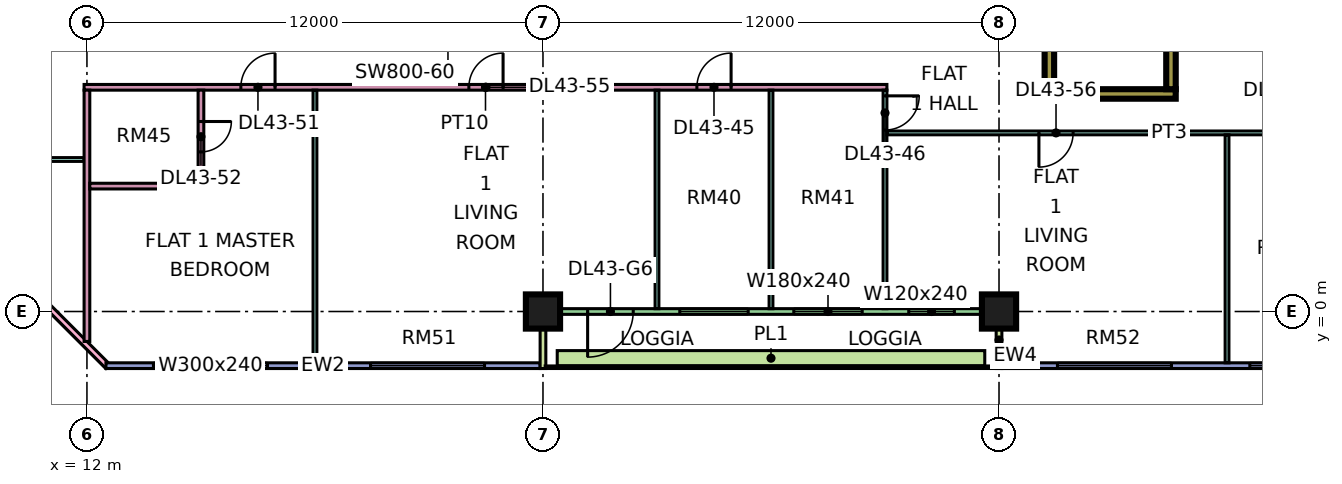
"""IFC4 building model, lengths in metres.
Left out: names, types, materials, properties, quantities, classifications, styles, units other than length and angle.
Written with IfcOpenShell. Run it as: python <this file> out.ifc"""

import sys

from ifc_helpers import new_model, si_unit, direction, frame, frame_2d, origin, origin_2d, place, context, subcontext, project, spatial, rectangle, extrude, element, fill, save


model = new_model("IFC4")
c1 = context("Model", 3, precision=1e-05, world=origin(), true_north=direction((0.0, 1.0)))
c2 = subcontext(c1, "Body", "Model", "MODEL_VIEW")
j1 = project(units=[si_unit("LENGTHUNIT", "METRE"), si_unit("PLANEANGLEUNIT", "RADIAN")], contexts=[c1])
p1 = place(None, origin())
s1 = spatial("IfcSite", under=j1, at=p1, CompositionType="ELEMENT")
p2 = place(p1, origin())
s2 = spatial("IfcBuilding", under=s1, at=p2, CompositionType="ELEMENT")
p3 = place(p2, frame((0.0, 0.0, 187.4)))
s3 = spatial("IfcBuildingStorey", under=s2, at=p3, CompositionType="ELEMENT", Elevation=187.4)
for number, where, z_axis, x_axis in (
    (1, (24.0, 0.0, 0.0), (0.0, 0.0, 1.0), (1.0, 0.0, 0.0)),
    (2, (36.0, 0.0, 0.0), (0.0, 0.0, 1.0), (1.0, 0.0, 0.0)),
):
    element("IfcColumn", number, at=place(p3, frame(where, z_axis=z_axis, x_axis=x_axis)), inside=s3, PredefinedType="COLUMN", context=c2, shape_type="SweptSolid", body=[
        extrude(rectangle(XDim=0.9, YDim=0.9, at=origin_2d()), origin(), (0.0, 0.0, 1.0), 3.75),
    ])
p4 = place(p3, frame((37.2, 5.725, 0.0), z_axis=(0.0, 0.0, 1.0), x_axis=(1.0, 0.0, 0.0)))
e3 = element("IfcWall", 3, at=p4, inside=s3, PredefinedType="SHEAR", context=c2, shape_type="SweptSolid", body=[
    extrude(rectangle(XDim=3.45, YDim=0.25, at=frame_2d((1.725, 0.0))), origin(), (0.0, 0.0, 1.0), 3.75),
])
for number, where, z_axis, x_axis in (
    (4, (37.325, 5.85, 0.0), (0.0, 0.0, 1.0), (0.0, 1.0, 0.0)),
    (5, (40.525, 5.85, 0.0), (0.0, 0.0, 1.0), (0.0, 1.0, 0.0)),
):
    element("IfcWall", number, at=place(p3, frame(where, z_axis=z_axis, x_axis=x_axis)), inside=s3, PredefinedType="SHEAR", context=c2, shape_type="SweptSolid", body=[
        extrude(rectangle(XDim=6.5, YDim=0.25, at=frame_2d((3.25, 0.0))), origin(), (0.0, 0.0, 1.0), 3.75),
    ])
p5 = place(p3, frame((-1.447, 12.553, 0.0), z_axis=(0.0, 0.0, 1.0), x_axis=(0.707106781187, -0.707106781187, 0.0)))
e6 = element("IfcWall", 6, at=p5, inside=s3, PredefinedType="SOLIDWALL", context=c2, shape_type="SweptSolid", body=[
    extrude(rectangle(XDim=19.799, YDim=0.15, at=frame_2d((9.899, 0.0))), origin(), (0.0, 0.0, 1.0), 3.35),
])
p6 = place(p5, frame((2.212, 0.0, 0.45)))
e7 = element("IfcOpeningElement", 7, at=p6, cuts=e6, PredefinedType="OPENING", context=c2, shape_type="SweptSolid", body=[
    extrude(rectangle(XDim=3.0, YDim=2.4, at=frame_2d((1.5, 1.2))), frame((0.0, 0.085, 0.0), z_axis=(0.0, -1.0, 0.0), x_axis=(1.0, 0.0, 0.0)), (0.0, 0.0, 1.0), 0.17),
])
p7 = place(p5, frame((10.216, 0.0, 0.45)))
e8 = element("IfcOpeningElement", 8, at=p7, cuts=e6, PredefinedType="OPENING", context=c2, shape_type="SweptSolid", body=[
    extrude(rectangle(XDim=3.0, YDim=2.4, at=frame_2d((1.5, 1.2))), frame((0.0, 0.085, 0.0), z_axis=(0.0, -1.0, 0.0), x_axis=(1.0, 0.0, 0.0)), (0.0, 0.0, 1.0), 0.17),
])
p8 = place(p3, frame((12.5, -1.425, 0.0), z_axis=(0.0, 0.0, 1.0), x_axis=(1.0, 0.0, 0.0)))
e9 = element("IfcWall", 9, at=p8, inside=s3, PredefinedType="SOLIDWALL", context=c2, shape_type="SweptSolid", body=[
    extrude(rectangle(XDim=11.425, YDim=0.15, at=frame_2d((5.712, 0.0))), origin(), (0.0, 0.0, 1.0), 3.35),
])
p9 = place(p8, frame((1.25, 0.0, 0.45)))
e10 = element("IfcOpeningElement", 10, at=p9, cuts=e9, PredefinedType="OPENING", context=c2, shape_type="SweptSolid", body=[
    extrude(rectangle(XDim=3.0, YDim=2.4, at=frame_2d((1.5, 1.2))), frame((0.0, 0.085, 0.0), z_axis=(0.0, -1.0, 0.0), x_axis=(1.0, 0.0, 0.0)), (0.0, 0.0, 1.0), 0.17),
])
p10 = place(p8, frame((6.962, 0.0, 0.45)))
e11 = element("IfcOpeningElement", 11, at=p10, cuts=e9, PredefinedType="OPENING", context=c2, shape_type="SweptSolid", body=[
    extrude(rectangle(XDim=3.0, YDim=2.4, at=frame_2d((1.5, 1.2))), frame((0.0, 0.085, 0.0), z_axis=(0.0, -1.0, 0.0), x_axis=(1.0, 0.0, 0.0)), (0.0, 0.0, 1.0), 0.17),
])
p11 = place(p3, frame((24.075, 0.0, 0.0), z_axis=(0.0, 0.0, 1.0), x_axis=(1.0, 0.0, 0.0)))
e12 = element("IfcWall", 12, at=p11, inside=s3, PredefinedType="SOLIDWALL", context=c2, shape_type="SweptSolid", body=[
    extrude(rectangle(XDim=11.85, YDim=0.15, at=frame_2d((5.925, 0.0))), origin(), (0.0, 0.0, 1.0), 3.35),
])
p12 = place(p11, frame((1.1, 0.0, 0.0)))
e13 = element("IfcOpeningElement", 13, at=p12, cuts=e12, PredefinedType="OPENING", context=c2, shape_type="SweptSolid", body=[
    extrude(rectangle(XDim=1.2, YDim=2.4, at=frame_2d((0.6, 1.2))), frame((0.0, 0.085, 0.0), z_axis=(0.0, -1.0, 0.0), x_axis=(1.0, 0.0, 0.0)), (0.0, 0.0, 1.0), 0.17),
])
p13 = place(p11, frame((3.525, 0.0, 0.45)))
e14 = element("IfcOpeningElement", 14, at=p13, cuts=e12, PredefinedType="OPENING", context=c2, shape_type="SweptSolid", body=[
    extrude(rectangle(XDim=1.8, YDim=2.4, at=frame_2d((0.9, 1.2))), frame((0.0, 0.085, 0.0), z_axis=(0.0, -1.0, 0.0), x_axis=(1.0, 0.0, 0.0)), (0.0, 0.0, 1.0), 0.17),
])
p14 = place(p11, frame((6.525, 0.0, 0.45)))
e15 = element("IfcOpeningElement", 15, at=p14, cuts=e12, PredefinedType="OPENING", context=c2, shape_type="SweptSolid", body=[
    extrude(rectangle(XDim=1.8, YDim=2.4, at=frame_2d((0.9, 1.2))), frame((0.0, 0.085, 0.0), z_axis=(0.0, -1.0, 0.0), x_axis=(1.0, 0.0, 0.0)), (0.0, 0.0, 1.0), 0.17),
])
p15 = place(p11, frame((9.55, 0.0, 0.45)))
e16 = element("IfcOpeningElement", 16, at=p15, cuts=e12, PredefinedType="OPENING", context=c2, shape_type="SweptSolid", body=[
    extrude(rectangle(XDim=1.2, YDim=2.4, at=frame_2d((0.6, 1.2))), frame((0.0, 0.085, 0.0), z_axis=(0.0, -1.0, 0.0), x_axis=(1.0, 0.0, 0.0)), (0.0, 0.0, 1.0), 0.17),
])
for number, where, z_axis, x_axis in (
    (17, (24.0, -1.5, 0.0), (0.0, 0.0, 1.0), (0.0, 1.0, 0.0)),
    (18, (36.0, -1.5, 0.0), (0.0, 0.0, 1.0), (0.0, 1.0, 0.0)),
):
    element("IfcWall", number, at=place(p3, frame(where, z_axis=z_axis, x_axis=x_axis)), inside=s3, PredefinedType="SOLIDWALL", context=c2, shape_type="SweptSolid", body=[
        extrude(rectangle(XDim=1.5, YDim=0.15, at=frame_2d((0.75, 0.0))), origin(), (0.0, 0.0, 1.0), 3.35),
    ])
p16 = place(p3, frame((36.075, -1.425, 0.0), z_axis=(0.0, 0.0, 1.0), x_axis=(1.0, 0.0, 0.0)))
e19 = element("IfcWall", 19, at=p16, inside=s3, PredefinedType="SOLIDWALL", context=c2, shape_type="SweptSolid", body=[
    extrude(rectangle(XDim=11.85, YDim=0.15, at=frame_2d((5.925, 0.0))), origin(), (0.0, 0.0, 1.0), 3.35),
])
p17 = place(p16, frame((1.462, 0.0, 0.45)))
e20 = element("IfcOpeningElement", 20, at=p17, cuts=e19, PredefinedType="OPENING", context=c2, shape_type="SweptSolid", body=[
    extrude(rectangle(XDim=3.0, YDim=2.4, at=frame_2d((1.5, 1.2))), frame((0.0, 0.085, 0.0), z_axis=(0.0, -1.0, 0.0), x_axis=(1.0, 0.0, 0.0)), (0.0, 0.0, 1.0), 0.17),
])
p18 = place(p16, frame((6.525, 0.0, 0.45)))
e21 = element("IfcOpeningElement", 21, at=p18, cuts=e19, PredefinedType="OPENING", context=c2, shape_type="SweptSolid", body=[
    extrude(rectangle(XDim=1.8, YDim=2.4, at=frame_2d((0.9, 1.2))), frame((0.0, 0.085, 0.0), z_axis=(0.0, -1.0, 0.0), x_axis=(1.0, 0.0, 0.0)), (0.0, 0.0, 1.0), 0.17),
])
p19 = place(p16, frame((9.488, 0.0, 0.45)))
e22 = element("IfcOpeningElement", 22, at=p19, cuts=e19, PredefinedType="OPENING", context=c2, shape_type="SweptSolid", body=[
    extrude(rectangle(XDim=1.8, YDim=2.4, at=frame_2d((0.9, 1.2))), frame((0.0, 0.085, 0.0), z_axis=(0.0, -1.0, 0.0), x_axis=(1.0, 0.0, 0.0)), (0.0, 0.0, 1.0), 0.17),
])
p20 = place(p3, frame((24.375, -1.229, 0.0), z_axis=(0.0, 0.0, 1.0), x_axis=(1.0, 0.0, 0.0)))
e23 = element("IfcWall", 23, at=p20, inside=s3, PredefinedType="SOLIDWALL", context=c2, shape_type="SweptSolid", body=[
    extrude(rectangle(XDim=11.25, YDim=0.4, at=frame_2d((5.625, 0.0))), origin(), (0.0, 0.0, 1.0), 0.7),
])
p21 = place(p3, frame((9.05, 4.0, 0.0), z_axis=(0.0, 0.0, 1.0), x_axis=(1.0, 0.0, 0.0)))
e24 = element("IfcWall", 24, at=p21, inside=s3, PredefinedType="PARTITIONING", context=c2, shape_type="SweptSolid", body=[
    extrude(rectangle(XDim=2.875, YDim=0.1, at=frame_2d((1.438, 0.0))), origin(), (0.0, 0.0, 1.0), 3.35),
])
p22 = place(p3, frame((11.925, 5.9, 0.0), z_axis=(0.0, 0.0, 1.0), x_axis=(1.0, 0.0, 0.0)))
e25 = element("IfcWall", 25, at=p22, inside=s3, PredefinedType="PARTITIONING", context=c2, shape_type="SweptSolid", body=[
    extrude(rectangle(XDim=21.125, YDim=0.15, at=frame_2d((10.562, 0.0))), origin(), (0.0, 0.0, 1.0), 3.35),
])
p23 = place(p22, frame((16.125, 0.0, 0.0)))
e26 = element("IfcOpeningElement", 26, at=p23, cuts=e25, PredefinedType="OPENING", context=c2, shape_type="SweptSolid", body=[
    extrude(rectangle(XDim=0.9, YDim=2.1, at=frame_2d((0.45, 1.05))), frame((0.0, 0.085, 0.0), z_axis=(0.0, -1.0, 0.0), x_axis=(1.0, 0.0, 0.0)), (0.0, 0.0, 1.0), 0.17),
])
p24 = place(p22, frame((4.125, 0.0, 0.0)))
e27 = element("IfcOpeningElement", 27, at=p24, cuts=e25, PredefinedType="OPENING", context=c2, shape_type="SweptSolid", body=[
    extrude(rectangle(XDim=0.9, YDim=2.1, at=frame_2d((0.45, 1.05))), frame((0.0, 0.085, 0.0), z_axis=(0.0, -1.0, 0.0), x_axis=(1.0, 0.0, 0.0)), (0.0, 0.0, 1.0), 0.17),
])
p25 = place(p22, frame((10.125, 0.0, 0.0)))
e28 = element("IfcOpeningElement", 28, at=p25, cuts=e25, PredefinedType="OPENING", context=c2, shape_type="SweptSolid", body=[
    extrude(rectangle(XDim=0.9, YDim=2.1, at=frame_2d((0.45, 1.05))), frame((0.0, 0.085, 0.0), z_axis=(0.0, -1.0, 0.0), x_axis=(1.0, 0.0, 0.0)), (0.0, 0.0, 1.0), 0.17),
])
p26 = place(p3, frame((12.0, -0.788, 0.0), z_axis=(0.0, 0.0, 1.0), x_axis=(0.0, 1.0, 0.0)))
e29 = element("IfcWall", 29, at=p26, inside=s3, PredefinedType="PARTITIONING", context=c2, shape_type="SweptSolid", body=[
    extrude(rectangle(XDim=6.613, YDim=0.15, at=frame_2d((3.306, 0.0))), origin(), (0.0, 0.0, 1.0), 3.35),
])
p27 = place(p3, frame((12.075, 3.3, 0.0), z_axis=(0.0, 0.0, 1.0), x_axis=(1.0, 0.0, 0.0)))
e30 = element("IfcWall", 30, at=p27, inside=s3, PredefinedType="PARTITIONING", context=c2, shape_type="SweptSolid", body=[
    extrude(rectangle(XDim=3.0, YDim=0.15, at=frame_2d((1.5, 0.0))), origin(), (0.0, 0.0, 1.0), 3.35),
])
p28 = place(p3, frame((15.0, 3.375, 0.0), z_axis=(0.0, 0.0, 1.0), x_axis=(0.0, 1.0, 0.0)))
e31 = element("IfcWall", 31, at=p28, inside=s3, PredefinedType="PARTITIONING", context=c2, shape_type="SweptSolid", body=[
    extrude(rectangle(XDim=2.45, YDim=0.15, at=frame_2d((1.225, 0.0))), origin(), (0.0, 0.0, 1.0), 3.35),
])
p29 = place(p28, frame((0.825, 0.0, 0.0)))
e32 = element("IfcOpeningElement", 32, at=p29, cuts=e31, PredefinedType="OPENING", context=c2, shape_type="SweptSolid", body=[
    extrude(rectangle(XDim=0.8, YDim=2.1, at=frame_2d((0.4, 1.05))), frame((0.0, 0.085, 0.0), z_axis=(0.0, -1.0, 0.0), x_axis=(1.0, 0.0, 0.0)), (0.0, 0.0, 1.0), 0.17),
])
p30 = place(p3, frame((18.0, -1.35, 0.0), z_axis=(0.0, 0.0, 1.0), x_axis=(0.0, 1.0, 0.0)))
e33 = element("IfcWall", 33, at=p30, inside=s3, PredefinedType="PARTITIONING", context=c2, shape_type="SweptSolid", body=[
    extrude(rectangle(XDim=7.175, YDim=0.1, at=frame_2d((3.587, 0.0))), origin(), (0.0, 0.0, 1.0), 3.35),
])
for number, where, z_axis, x_axis in (
    (34, (27.0, 0.074, 0.0), (0.0, 0.0, 1.0), (0.0, 1.0, 0.0)),
    (35, (30.0, 0.074, 0.0), (0.0, 0.0, 1.0), (0.0, 1.0, 0.0)),
):
    element("IfcWall", number, at=place(p3, frame(where, z_axis=z_axis, x_axis=x_axis)), inside=s3, PredefinedType="PARTITIONING", context=c2, shape_type="SweptSolid", body=[
        extrude(rectangle(XDim=5.751, YDim=0.1, at=frame_2d((2.875, 0.0))), origin(), (0.0, 0.0, 1.0), 3.35),
    ])
p31 = place(p3, frame((33.0, 0.074, 0.0), z_axis=(0.0, 0.0, 1.0), x_axis=(0.0, 1.0, 0.0)))
e36 = element("IfcWall", 36, at=p31, inside=s3, PredefinedType="PARTITIONING", context=c2, shape_type="SweptSolid", body=[
    extrude(rectangle(XDim=5.751, YDim=0.1, at=frame_2d((2.875, 0.0))), origin(), (0.0, 0.0, 1.0), 3.35),
])
p32 = place(p31, frame((4.701, 0.0, 0.0)))
e37 = element("IfcOpeningElement", 37, at=p32, cuts=e36, PredefinedType="OPENING", context=c2, shape_type="SweptSolid", body=[
    extrude(rectangle(XDim=0.9, YDim=2.1, at=frame_2d((0.45, 1.05))), frame((0.0, 0.06, 0.0), z_axis=(0.0, -1.0, 0.0), x_axis=(1.0, 0.0, 0.0)), (0.0, 0.0, 1.0), 0.12),
])
p33 = place(p3, frame((33.05, 4.7, 0.0), z_axis=(0.0, 0.0, 1.0), x_axis=(1.0, 0.0, 0.0)))
e38 = element("IfcWall", 38, at=p33, inside=s3, PredefinedType="PARTITIONING", context=c2, shape_type="SweptSolid", body=[
    extrude(rectangle(XDim=14.85, YDim=0.1, at=frame_2d((7.425, 0.0))), origin(), (0.0, 0.0, 1.0), 3.35),
])
p34 = place(p33, frame((10.0, 0.0, 0.0)))
e39 = element("IfcOpeningElement", 39, at=p34, cuts=e38, PredefinedType="OPENING", context=c2, shape_type="SweptSolid", body=[
    extrude(rectangle(XDim=0.9, YDim=2.1, at=frame_2d((0.45, 1.05))), frame((0.0, 0.06, 0.0), z_axis=(0.0, -1.0, 0.0), x_axis=(1.0, 0.0, 0.0)), (0.0, 0.0, 1.0), 0.12),
])
p35 = place(p33, frame((13.0, 0.0, 0.0)))
e40 = element("IfcOpeningElement", 40, at=p35, cuts=e38, PredefinedType="OPENING", context=c2, shape_type="SweptSolid", body=[
    extrude(rectangle(XDim=0.9, YDim=2.1, at=frame_2d((0.45, 1.05))), frame((0.0, 0.06, 0.0), z_axis=(0.0, -1.0, 0.0), x_axis=(1.0, 0.0, 0.0)), (0.0, 0.0, 1.0), 0.12),
])
p36 = place(p33, frame((4.0, 0.0, 0.0)))
e41 = element("IfcOpeningElement", 41, at=p36, cuts=e38, PredefinedType="OPENING", context=c2, shape_type="SweptSolid", body=[
    extrude(rectangle(XDim=0.9, YDim=2.1, at=frame_2d((0.45, 1.05))), frame((0.0, 0.06, 0.0), z_axis=(0.0, -1.0, 0.0), x_axis=(1.0, 0.0, 0.0)), (0.0, 0.0, 1.0), 0.12),
])
p37 = place(p3, frame((42.0, -1.35, 0.0), z_axis=(0.0, 0.0, 1.0), x_axis=(0.0, 1.0, 0.0)))
e42 = element("IfcWall", 42, at=p37, inside=s3, PredefinedType="PARTITIONING", context=c2, shape_type="SweptSolid", body=[
    extrude(rectangle(XDim=6.0, YDim=0.1, at=frame_2d((3.0, 0.0))), origin(), (0.0, 0.0, 1.0), 3.35),
])
p38 = place(p9, origin())
e43 = element("IfcWindow", 43, at=p38, inside=s3, PartitioningType="SINGLE_PANEL", PredefinedType="WINDOW", context=c2, shape_type="SweptSolid", body=[
    extrude(rectangle(XDim=3.0, YDim=2.4, at=frame_2d((1.5, 1.2))), frame((0.0, 0.03, 0.0), z_axis=(0.0, -1.0, 0.0), x_axis=(1.0, 0.0, 0.0)), (0.0, 0.0, 1.0), 0.06),
])
fill(e10, e43)
p39 = place(p10, origin())
e44 = element("IfcWindow", 44, at=p39, inside=s3, PartitioningType="SINGLE_PANEL", PredefinedType="WINDOW", context=c2, shape_type="SweptSolid", body=[
    extrude(rectangle(XDim=3.0, YDim=2.4, at=frame_2d((1.5, 1.2))), frame((0.0, 0.03, 0.0), z_axis=(0.0, -1.0, 0.0), x_axis=(1.0, 0.0, 0.0)), (0.0, 0.0, 1.0), 0.06),
])
fill(e11, e44)
p40 = place(p12, frame((1.2, 0.0, 0.0), z_axis=(0.0, 0.0, 1.0), x_axis=(-1.0, 0.0, 0.0)))
e45 = element("IfcDoor", 45, at=p40, inside=s3, OperationType="DOUBLE_DOOR_SINGLE_SWING", PredefinedType="DOOR", context=c2, shape_type="SweptSolid", body=[
    extrude(rectangle(XDim=1.2, YDim=2.4, at=frame_2d((0.6, 1.2))), frame((0.0, 0.025, 0.0), z_axis=(0.0, -1.0, 0.0), x_axis=(1.0, 0.0, 0.0)), (0.0, 0.0, 1.0), 0.05),
])
fill(e13, e45)
p41 = place(p13, origin())
e46 = element("IfcWindow", 46, at=p41, inside=s3, PartitioningType="SINGLE_PANEL", PredefinedType="WINDOW", context=c2, shape_type="SweptSolid", body=[
    extrude(rectangle(XDim=1.8, YDim=2.4, at=frame_2d((0.9, 1.2))), frame((0.0, 0.03, 0.0), z_axis=(0.0, -1.0, 0.0), x_axis=(1.0, 0.0, 0.0)), (0.0, 0.0, 1.0), 0.06),
])
fill(e14, e46)
p42 = place(p14, origin())
e47 = element("IfcWindow", 47, at=p42, inside=s3, PartitioningType="SINGLE_PANEL", PredefinedType="WINDOW", context=c2, shape_type="SweptSolid", body=[
    extrude(rectangle(XDim=1.8, YDim=2.4, at=frame_2d((0.9, 1.2))), frame((0.0, 0.03, 0.0), z_axis=(0.0, -1.0, 0.0), x_axis=(1.0, 0.0, 0.0)), (0.0, 0.0, 1.0), 0.06),
])
fill(e15, e47)
p43 = place(p15, origin())
e48 = element("IfcWindow", 48, at=p43, inside=s3, PartitioningType="SINGLE_PANEL", PredefinedType="WINDOW", context=c2, shape_type="SweptSolid", body=[
    extrude(rectangle(XDim=1.2, YDim=2.4, at=frame_2d((0.6, 1.2))), frame((0.0, 0.03, 0.0), z_axis=(0.0, -1.0, 0.0), x_axis=(1.0, 0.0, 0.0)), (0.0, 0.0, 1.0), 0.06),
])
fill(e16, e48)
p44 = place(p17, origin())
e49 = element("IfcWindow", 49, at=p44, inside=s3, PartitioningType="SINGLE_PANEL", PredefinedType="WINDOW", context=c2, shape_type="SweptSolid", body=[
    extrude(rectangle(XDim=3.0, YDim=2.4, at=frame_2d((1.5, 1.2))), frame((0.0, 0.03, 0.0), z_axis=(0.0, -1.0, 0.0), x_axis=(1.0, 0.0, 0.0)), (0.0, 0.0, 1.0), 0.06),
])
fill(e20, e49)
p45 = place(p18, origin())
e50 = element("IfcWindow", 50, at=p45, inside=s3, PartitioningType="SINGLE_PANEL", PredefinedType="WINDOW", context=c2, shape_type="SweptSolid", body=[
    extrude(rectangle(XDim=1.8, YDim=2.4, at=frame_2d((0.9, 1.2))), frame((0.0, 0.03, 0.0), z_axis=(0.0, -1.0, 0.0), x_axis=(1.0, 0.0, 0.0)), (0.0, 0.0, 1.0), 0.06),
])
fill(e21, e50)
p46 = place(p23, frame((0.9, 0.0, 0.0), z_axis=(0.0, 0.0, 1.0), x_axis=(-1.0, 0.0, 0.0)))
e51 = element("IfcDoor", 51, at=p46, inside=s3, OperationType="SINGLE_SWING_RIGHT", PredefinedType="DOOR", context=c2, shape_type="SweptSolid", body=[
    extrude(rectangle(XDim=0.9, YDim=2.1, at=frame_2d((0.45, 1.05))), frame((0.0, 0.025, 0.0), z_axis=(0.0, -1.0, 0.0), x_axis=(1.0, 0.0, 0.0)), (0.0, 0.0, 1.0), 0.05),
])
fill(e26, e51)
p47 = place(p32, origin())
e52 = element("IfcDoor", 52, at=p47, inside=s3, OperationType="SINGLE_SWING_RIGHT", PredefinedType="DOOR", context=c2, shape_type="SweptSolid", body=[
    extrude(rectangle(XDim=0.9, YDim=2.1, at=frame_2d((0.45, 1.05))), frame((0.0, 0.025, 0.0), z_axis=(0.0, -1.0, 0.0), x_axis=(1.0, 0.0, 0.0)), (0.0, 0.0, 1.0), 0.05),
])
fill(e37, e52)
p48 = place(p24, frame((0.9, 0.0, 0.0), z_axis=(0.0, 0.0, 1.0), x_axis=(-1.0, 0.0, 0.0)))
e53 = element("IfcDoor", 53, at=p48, inside=s3, OperationType="SINGLE_SWING_RIGHT", PredefinedType="DOOR", context=c2, shape_type="SweptSolid", body=[
    extrude(rectangle(XDim=0.9, YDim=2.1, at=frame_2d((0.45, 1.05))), frame((0.0, 0.025, 0.0), z_axis=(0.0, -1.0, 0.0), x_axis=(1.0, 0.0, 0.0)), (0.0, 0.0, 1.0), 0.05),
])
fill(e27, e53)
p49 = place(p29, origin())
e54 = element("IfcDoor", 54, at=p49, inside=s3, OperationType="SINGLE_SWING_RIGHT", PredefinedType="DOOR", context=c2, shape_type="SweptSolid", body=[
    extrude(rectangle(XDim=0.8, YDim=2.1, at=frame_2d((0.4, 1.05))), frame((0.0, 0.025, 0.0), z_axis=(0.0, -1.0, 0.0), x_axis=(1.0, 0.0, 0.0)), (0.0, 0.0, 1.0), 0.05),
])
fill(e32, e54)
p50 = place(p25, frame((0.9, 0.0, 0.0), z_axis=(0.0, 0.0, 1.0), x_axis=(-1.0, 0.0, 0.0)))
e55 = element("IfcDoor", 55, at=p50, inside=s3, OperationType="SINGLE_SWING_RIGHT", PredefinedType="DOOR", context=c2, shape_type="SweptSolid", body=[
    extrude(rectangle(XDim=0.9, YDim=2.1, at=frame_2d((0.45, 1.05))), frame((0.0, 0.025, 0.0), z_axis=(0.0, -1.0, 0.0), x_axis=(1.0, 0.0, 0.0)), (0.0, 0.0, 1.0), 0.05),
])
fill(e28, e55)
p51 = place(p36, frame((0.9, 0.0, 0.0), z_axis=(0.0, 0.0, 1.0), x_axis=(-1.0, 0.0, 0.0)))
e56 = element("IfcDoor", 56, at=p51, inside=s3, OperationType="SINGLE_SWING_LEFT", PredefinedType="DOOR", context=c2, shape_type="SweptSolid", body=[
    extrude(rectangle(XDim=0.9, YDim=2.1, at=frame_2d((0.45, 1.05))), frame((0.0, 0.025, 0.0), z_axis=(0.0, -1.0, 0.0), x_axis=(1.0, 0.0, 0.0)), (0.0, 0.0, 1.0), 0.05),
])
fill(e41, e56)
save(model, sys.argv[1])
